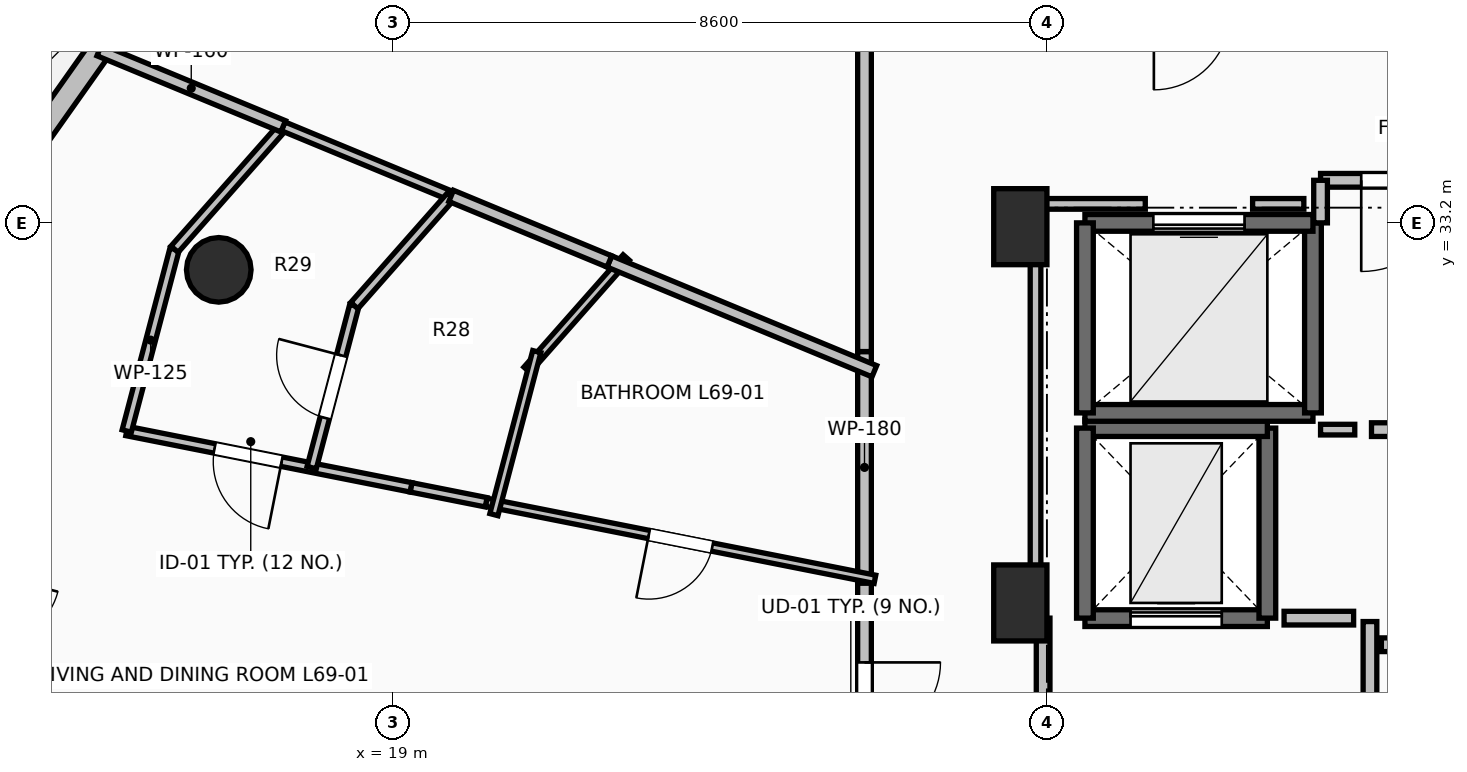
"""IFC4 building model, lengths in metres.
Left out: names, types, materials, properties, quantities, classifications, styles, units other than length and angle.
Written with IfcOpenShell. Run it as: python <this file> out.ifc"""

import sys

from ifc_helpers import new_model, si_unit, direction, frame, frame_2d, origin, origin_2d, place, context, subcontext, project, spatial, rectangle, circle, extrude, element, fill, save


model = new_model("IFC4")
c1 = context("Model", 3, precision=1e-05, world=origin(), true_north=direction((0.0, 1.0)))
c2 = subcontext(c1, "Body", "Model", "MODEL_VIEW")
j1 = project(units=[si_unit("LENGTHUNIT", "METRE"), si_unit("PLANEANGLEUNIT", "RADIAN")], contexts=[c1])
p1 = place(None, origin())
s1 = spatial("IfcSite", under=j1, at=p1, CompositionType="ELEMENT")
p2 = place(p1, origin())
s2 = spatial("IfcBuilding", under=s1, at=p2, CompositionType="ELEMENT")
p3 = place(p2, frame((0.0, 0.0, 255.55)))
s3 = spatial("IfcBuildingStorey", under=s2, at=p3, CompositionType="ELEMENT", Elevation=255.55)
p4 = place(p3, frame((16.705, 32.582, 0.0), z_axis=(0.0, 0.0, 1.0), x_axis=(-0.923879532511, 0.382683432365, 0.0)))
e1 = element("IfcColumn", 1, at=p4, inside=s3, PredefinedType="COLUMN", context=c2, shape_type="SweptSolid", body=[
    extrude(circle(Radius=0.425, at=origin_2d()), origin(), (0.0, 0.0, 1.0), 3.55),
])
for number, where, z_axis, x_axis in (
    (2, (27.25, 28.2, 0.0), (0.0, 0.0, 1.0), (1.0, 0.0, 0.0)),
    (3, (27.25, 33.15, 0.0), (0.0, 0.0, 1.0), (1.0, 0.0, 0.0)),
):
    element("IfcColumn", number, at=place(p3, frame(where, z_axis=z_axis, x_axis=x_axis)), inside=s3, PredefinedType="PILASTER", context=c2, shape_type="SweptSolid", body=[
        extrude(rectangle(XDim=0.7, YDim=1.0, at=origin_2d()), origin(), (0.0, 0.0, 1.0), 3.55),
    ])
p5 = place(p3, frame((16.216, 37.006, 0.0), z_axis=(0.0, 0.0, 1.0), x_axis=(-0.577261247247, -0.816559521668, 0.0)))
e4 = element("IfcWall", 4, at=p5, inside=s3, PredefinedType="STANDARD", context=c2, shape_type="SweptSolid", body=[
    extrude(rectangle(XDim=4.194, YDim=0.3, at=frame_2d((2.097, 0.0))), origin(), (0.0, 0.0, 1.0), 3.29),
])
p6 = place(p3, frame((28.1, 28.0, 0.0), z_axis=(0.0, 0.0, 1.0), x_axis=(1.0, 0.0, 0.0)))
e5 = element("IfcWall", 5, at=p6, inside=s3, PredefinedType="SHEAR", context=c2, shape_type="SweptSolid", body=[
    extrude(rectangle(XDim=2.4, YDim=0.22, at=frame_2d((1.2, 0.0))), origin(), (0.0, 0.0, 1.0), 3.29),
])
p7 = place(p6, frame((0.6, 0.0, 0.0)))
e6 = element("IfcOpeningElement", 6, at=p7, cuts=e5, PredefinedType="OPENING", context=c2, shape_type="SweptSolid", body=[
    extrude(rectangle(XDim=1.2, YDim=2.2, at=frame_2d((0.6, 1.1))), frame((0.0, 0.125, 0.0), z_axis=(0.0, -1.0, 0.0), x_axis=(1.0, 0.0, 0.0)), (0.0, 0.0, 1.0), 0.25),
])
p8 = place(p3, frame((30.5, 28.0, 0.0), z_axis=(0.0, 0.0, 1.0), x_axis=(0.0, 1.0, 0.0)))
e7 = element("IfcWall", 7, at=p8, inside=s3, PredefinedType="SHEAR", context=c2, shape_type="SweptSolid", body=[
    extrude(rectangle(XDim=2.5, YDim=0.22, at=frame_2d((1.25, 0.0))), origin(), (0.0, 0.0, 1.0), 3.29),
])
p9 = place(p3, frame((30.5, 30.5, 0.0), z_axis=(0.0, 0.0, 1.0), x_axis=(-1.0, 0.0, 0.0)))
e8 = element("IfcWall", 8, at=p9, inside=s3, PredefinedType="SHEAR", context=c2, shape_type="SweptSolid", body=[
    extrude(rectangle(XDim=2.4, YDim=0.22, at=frame_2d((1.2, 0.0))), origin(), (0.0, 0.0, 1.0), 3.29),
])
p10 = place(p3, frame((28.1, 30.5, 0.0), z_axis=(0.0, 0.0, 1.0), x_axis=(0.0, -1.0, 0.0)))
e9 = element("IfcWall", 9, at=p10, inside=s3, PredefinedType="SHEAR", context=c2, shape_type="SweptSolid", body=[
    extrude(rectangle(XDim=2.5, YDim=0.22, at=frame_2d((1.25, 0.0))), origin(), (0.0, 0.0, 1.0), 3.29),
])
p11 = place(p3, frame((28.1, 30.7, 0.0), z_axis=(0.0, 0.0, 1.0), x_axis=(1.0, 0.0, 0.0)))
e10 = element("IfcWall", 10, at=p11, inside=s3, PredefinedType="SOLIDWALL", context=c2, shape_type="SweptSolid", body=[
    extrude(rectangle(XDim=3.0, YDim=0.22, at=frame_2d((1.5, 0.0))), origin(), (0.0, 0.0, 1.0), 3.29),
])
p12 = place(p3, frame((31.1, 30.7, 0.0), z_axis=(0.0, 0.0, 1.0), x_axis=(0.0, 1.0, 0.0)))
e11 = element("IfcWall", 11, at=p12, inside=s3, PredefinedType="SOLIDWALL", context=c2, shape_type="SweptSolid", body=[
    extrude(rectangle(XDim=2.5, YDim=0.22, at=frame_2d((1.25, 0.0))), origin(), (0.0, 0.0, 1.0), 3.29),
])
p13 = place(p3, frame((31.1, 33.2, 0.0), z_axis=(0.0, 0.0, 1.0), x_axis=(-1.0, 0.0, 0.0)))
e12 = element("IfcWall", 12, at=p13, inside=s3, PredefinedType="SOLIDWALL", context=c2, shape_type="SweptSolid", body=[
    extrude(rectangle(XDim=3.0, YDim=0.22, at=frame_2d((1.5, 0.0))), origin(), (0.0, 0.0, 1.0), 3.29),
])
p14 = place(p13, frame((0.9, 0.0, 0.0)))
e13 = element("IfcOpeningElement", 13, at=p14, cuts=e12, PredefinedType="OPENING", context=c2, shape_type="SweptSolid", body=[
    extrude(rectangle(XDim=1.2, YDim=2.2, at=frame_2d((0.6, 1.1))), frame((0.0, 0.125, 0.0), z_axis=(0.0, -1.0, 0.0), x_axis=(1.0, 0.0, 0.0)), (0.0, 0.0, 1.0), 0.25),
])
p15 = place(p3, frame((28.1, 33.2, 0.0), z_axis=(0.0, 0.0, 1.0), x_axis=(0.0, -1.0, 0.0)))
e14 = element("IfcWall", 14, at=p15, inside=s3, PredefinedType="SOLIDWALL", context=c2, shape_type="SweptSolid", body=[
    extrude(rectangle(XDim=2.5, YDim=0.22, at=frame_2d((1.25, 0.0))), origin(), (0.0, 0.0, 1.0), 3.29),
])
p16 = place(p3, frame((31.85, 24.045, 0.0), z_axis=(0.0, 0.0, 1.0), x_axis=(0.0, 1.0, 0.0)))
e15 = element("IfcWall", 15, at=p16, inside=s3, PredefinedType="PARTITIONING", context=c2, shape_type="SweptSolid", body=[
    extrude(rectangle(XDim=3.91, YDim=0.18, at=frame_2d((1.955, 0.0))), origin(), (0.0, 0.0, 1.0), 3.29),
])
p17 = place(p16, frame((1.355, 0.0, 0.0)))
e16 = element("IfcOpeningElement", 16, at=p17, cuts=e15, PredefinedType="OPENING", context=c2, shape_type="SweptSolid", body=[
    extrude(rectangle(XDim=1.2, YDim=2.15, at=frame_2d((0.6, 1.075))), frame((0.0, 0.105, 0.0), z_axis=(0.0, -1.0, 0.0), x_axis=(1.0, 0.0, 0.0)), (0.0, 0.0, 1.0), 0.21),
])
p18 = place(p3, frame((27.55, 28.0, 0.0), z_axis=(0.0, 0.0, 1.0), x_axis=(0.0, -1.0, 0.0)))
e17 = element("IfcWall", 17, at=p18, inside=s3, PredefinedType="PARTITIONING", context=c2, shape_type="SweptSolid", body=[
    extrude(rectangle(XDim=4.05, YDim=0.18, at=frame_2d((2.025, 0.0))), origin(), (0.0, 0.0, 1.0), 3.29),
])
p19 = place(p18, frame((1.425, 0.0, 0.0)))
e18 = element("IfcOpeningElement", 18, at=p19, cuts=e17, PredefinedType="OPENING", context=c2, shape_type="SweptSolid", body=[
    extrude(rectangle(XDim=1.2, YDim=2.15, at=frame_2d((0.6, 1.075))), frame((0.0, 0.105, 0.0), z_axis=(0.0, -1.0, 0.0), x_axis=(1.0, 0.0, 0.0)), (0.0, 0.0, 1.0), 0.21),
])
p20 = place(p3, frame((31.87, 30.48, 0.0), z_axis=(0.0, 0.0, 1.0), x_axis=(1.0, 0.0, 0.0)))
e19 = element("IfcWall", 19, at=p20, inside=s3, PredefinedType="PARTITIONING", context=c2, shape_type="SweptSolid", body=[
    extrude(rectangle(XDim=1.6, YDim=0.18, at=frame_2d((0.8, 0.0))), origin(), (0.0, 0.0, 1.0), 3.29),
])
p21 = place(p3, frame((33.47, 33.76, 0.0), z_axis=(0.0, 0.0, 1.0), x_axis=(-1.0, 0.0, 0.0)))
e20 = element("IfcWall", 20, at=p21, inside=s3, PredefinedType="PARTITIONING", context=c2, shape_type="SweptSolid", body=[
    extrude(rectangle(XDim=2.27, YDim=0.18, at=frame_2d((1.135, 0.0))), origin(), (0.0, 0.0, 1.0), 3.29),
])
p22 = place(p21, frame((0.535, 0.0, 0.0)))
e21 = element("IfcOpeningElement", 21, at=p22, cuts=e20, PredefinedType="OPENING", context=c2, shape_type="SweptSolid", body=[
    extrude(rectangle(XDim=1.2, YDim=2.15, at=frame_2d((0.6, 1.075))), frame((0.0, 0.105, 0.0), z_axis=(0.0, -1.0, 0.0), x_axis=(1.0, 0.0, 0.0)), (0.0, 0.0, 1.0), 0.21),
])
p23 = place(p3, frame((31.2, 33.76, 0.0), z_axis=(0.0, 0.0, 1.0), x_axis=(0.0, -1.0, 0.0)))
e22 = element("IfcWall", 22, at=p23, inside=s3, PredefinedType="PARTITIONING", context=c2, shape_type="SweptSolid", body=[
    extrude(rectangle(XDim=0.56, YDim=0.18, at=frame_2d((0.28, 0.0))), origin(), (0.0, 0.0, 1.0), 3.29),
])
p24 = place(p3, frame((39.19, 27.65, 0.0), z_axis=(0.0, 0.0, 1.0), x_axis=(-1.0, 0.0, 0.0)))
e23 = element("IfcWall", 23, at=p24, inside=s3, PredefinedType="PARTITIONING", context=c2, shape_type="SweptSolid", body=[
    extrude(rectangle(XDim=7.19, YDim=0.18, at=frame_2d((3.595, 0.0))), origin(), (0.0, 0.0, 1.0), 3.29),
])
p25 = place(p24, frame((3.095, 0.0, 0.0)))
e24 = element("IfcOpeningElement", 24, at=p25, cuts=e23, PredefinedType="OPENING", context=c2, shape_type="SweptSolid", body=[
    extrude(rectangle(XDim=1.0, YDim=2.15, at=frame_2d((0.5, 1.075))), frame((0.0, 0.105, 0.0), z_axis=(0.0, -1.0, 0.0), x_axis=(1.0, 0.0, 0.0)), (0.0, 0.0, 1.0), 0.21),
])
p26 = place(p3, frame((25.2, 28.599, 0.0), z_axis=(0.0, 0.0, 1.0), x_axis=(0.0, -1.0, 0.0)))
e25 = element("IfcWall", 25, at=p26, inside=s3, PredefinedType="PARTITIONING", context=c2, shape_type="SweptSolid", body=[
    extrude(rectangle(XDim=3.363, YDim=0.18, at=frame_2d((1.682, 0.0))), origin(), (0.0, 0.0, 1.0), 2.482),
])
p27 = place(p26, frame((1.181, 0.0, 0.0)))
e26 = element("IfcOpeningElement", 26, at=p27, cuts=e25, PredefinedType="OPENING", context=c2, shape_type="SweptSolid", body=[
    extrude(rectangle(XDim=1.0, YDim=2.15, at=frame_2d((0.5, 1.075))), frame((0.0, 0.105, 0.0), z_axis=(0.0, -1.0, 0.0), x_axis=(1.0, 0.0, 0.0)), (0.0, 0.0, 1.0), 0.21),
])
p28 = place(p3, frame((25.2, 31.507, 0.0), z_axis=(0.0, 0.0, 1.0), x_axis=(0.0, -1.0, 0.0)))
e27 = element("IfcWall", 27, at=p28, inside=s3, PredefinedType="PARTITIONING", context=c2, shape_type="SweptSolid", body=[
    extrude(rectangle(XDim=3.048, YDim=0.18, at=frame_2d((1.524, 0.0))), origin(), (0.0, 0.0, 1.0), 2.482),
])
p29 = place(p3, frame((25.2, 35.95, 0.0), z_axis=(0.0, 0.0, 1.0), x_axis=(0.0, -1.0, 0.0)))
e28 = element("IfcWall", 28, at=p29, inside=s3, PredefinedType="PARTITIONING", context=c2, shape_type="SweptSolid", body=[
    extrude(rectangle(XDim=4.443, YDim=0.18, at=frame_2d((2.221, 0.0))), origin(), (0.0, 0.0, 1.0), 2.482),
])
p30 = place(p3, frame((19.236, 29.72, 0.0), z_axis=(0.0, 0.0, 1.0), x_axis=(-0.980906665774, 0.194479081243, 0.0)))
e29 = element("IfcWall", 29, at=p30, inside=s3, PredefinedType="PARTITIONING", context=c2, shape_type="SweptSolid", body=[
    extrude(rectangle(XDim=3.815, YDim=0.125, at=frame_2d((1.907, 0.0))), origin(), (0.0, 0.0, 1.0), 2.874),
])
p31 = place(p30, frame((1.737, 0.0, 0.0)))
e30 = element("IfcOpeningElement", 30, at=p31, cuts=e29, PredefinedType="OPENING", context=c2, shape_type="SweptSolid", body=[
    extrude(rectangle(XDim=0.9, YDim=2.1, at=frame_2d((0.45, 1.05))), frame((0.0, 0.077, 0.0), z_axis=(0.0, -1.0, 0.0), x_axis=(1.0, 0.0, 0.0)), (0.0, 0.0, 1.0), 0.155),
])
p32 = place(p3, frame((15.494, 30.462, 0.0), z_axis=(0.0, 0.0, 1.0), x_axis=(0.254459276467, 0.967083489995, 0.0)))
e31 = element("IfcWall", 31, at=p32, inside=s3, PredefinedType="PARTITIONING", context=c2, shape_type="SweptSolid", body=[
    extrude(rectangle(XDim=2.472, YDim=0.125, at=frame_2d((1.236, 0.0))), origin(), (0.0, 0.0, 1.0), 3.29),
])
p33 = place(p3, frame((16.123, 32.853, 0.0), z_axis=(0.0, 0.0, 1.0), x_axis=(0.662205183315, 0.749322557508, 0.0)))
e32 = element("IfcWall", 32, at=p33, inside=s3, PredefinedType="PARTITIONING", context=c2, shape_type="SweptSolid", body=[
    extrude(rectangle(XDim=2.158, YDim=0.125, at=frame_2d((1.079, 0.0))), origin(), (0.0, 0.0, 1.0), 3.29),
])
p34 = place(p3, frame((17.552, 34.47, 0.0), z_axis=(0.0, 0.0, 1.0), x_axis=(0.923932252837, -0.382556129434, 0.0)))
e33 = element("IfcWall", 33, at=p34, inside=s3, PredefinedType="PARTITIONING", context=c2, shape_type="SweptSolid", body=[
    extrude(rectangle(XDim=2.392, YDim=0.125, at=frame_2d((1.196, 0.0))), origin(), (0.0, 0.0, 1.0), 2.874),
])
p35 = place(p3, frame((25.337, 28.511, 0.0), z_axis=(0.0, 0.0, 1.0), x_axis=(-0.980930272027, 0.194359978959, 0.0)))
e34 = element("IfcWall", 34, at=p35, inside=s3, PredefinedType="PARTITIONING", context=c2, shape_type="SweptSolid", body=[
    extrude(rectangle(XDim=5.214, YDim=0.11, at=frame_2d((2.607, 0.0))), origin(), (0.0, 0.0, 1.0), 2.936),
])
p36 = place(p35, frame((2.182, 0.0, 0.0)))
e35 = element("IfcOpeningElement", 35, at=p36, cuts=e34, PredefinedType="OPENING", context=c2, shape_type="SweptSolid", body=[
    extrude(rectangle(XDim=0.85, YDim=2.1, at=frame_2d((0.425, 1.05))), frame((0.0, 0.07, 0.0), z_axis=(0.0, -1.0, 0.0), x_axis=(1.0, 0.0, 0.0)), (0.0, 0.0, 1.0), 0.14),
])
p37 = place(p3, frame((20.223, 29.524, 0.0), z_axis=(0.0, 0.0, 1.0), x_axis=(-0.98086901598, 0.194668881667, 0.0)))
e36 = element("IfcWall", 36, at=p37, inside=s3, PredefinedType="PARTITIONING", context=c2, shape_type="SweptSolid", body=[
    extrude(rectangle(XDim=1.006, YDim=0.125, at=frame_2d((0.503, 0.0))), origin(), (0.0, 0.0, 1.0), 3.022),
])
p38 = place(p3, frame((17.552, 34.47, 0.0), z_axis=(0.0, 0.0, 1.0), x_axis=(-0.9239134198, 0.382601610965, 0.0)))
e37 = element("IfcWall", 37, at=p38, inside=s3, PredefinedType="PARTITIONING", context=c2, shape_type="SweptSolid", body=[
    extrude(rectangle(XDim=2.618, YDim=0.16, at=frame_2d((1.309, 0.0))), origin(), (0.0, 0.0, 1.0), 3.29),
])
p39 = place(p3, frame((17.927, 29.98, 0.0), z_axis=(0.0, 0.0, 1.0), x_axis=(0.254476946675, 0.967078840432, 0.0)))
e38 = element("IfcWall", 38, at=p39, inside=s3, PredefinedType="PARTITIONING", context=c2, shape_type="SweptSolid", body=[
    extrude(rectangle(XDim=2.205, YDim=0.125, at=frame_2d((1.102, 0.0))), origin(), (0.0, 0.0, 1.0), 2.482),
])
p40 = place(p39, frame((0.677, 0.0, 0.0)))
e39 = element("IfcOpeningElement", 39, at=p40, cuts=e38, PredefinedType="OPENING", context=c2, shape_type="SweptSolid", body=[
    extrude(rectangle(XDim=0.85, YDim=2.1, at=frame_2d((0.425, 1.05))), frame((0.0, 0.077, 0.0), z_axis=(0.0, -1.0, 0.0), x_axis=(1.0, 0.0, 0.0)), (0.0, 0.0, 1.0), 0.155),
])
p41 = place(p3, frame((18.488, 32.112, 0.0), z_axis=(0.0, 0.0, 1.0), x_axis=(0.661856531983, 0.749630529709, 0.0)))
e40 = element("IfcWall", 40, at=p41, inside=s3, PredefinedType="PARTITIONING", context=c2, shape_type="SweptSolid", body=[
    extrude(rectangle(XDim=1.925, YDim=0.125, at=frame_2d((0.962, 0.0))), origin(), (0.0, 0.0, 1.0), 2.482),
])
p42 = place(p3, frame((22.066, 32.744, 0.0), z_axis=(0.0, 0.0, 1.0), x_axis=(-0.662047420969, -0.749461948593, 0.0)))
e41 = element("IfcWall", 41, at=p42, inside=s3, PredefinedType="PARTITIONING", context=c2, shape_type="SweptSolid", body=[
    extrude(rectangle(XDim=1.972, YDim=0.11, at=frame_2d((0.986, 0.0))), origin(), (0.0, 0.0, 1.0), 3.29),
])
p43 = place(p3, frame((20.889, 31.506, 0.0), z_axis=(0.0, 0.0, 1.0), x_axis=(-0.254406599134, -0.967097348935, 0.0)))
e42 = element("IfcWall", 42, at=p43, inside=s3, PredefinedType="PARTITIONING", context=c2, shape_type="SweptSolid", body=[
    extrude(rectangle(XDim=2.218, YDim=0.11, at=frame_2d((1.109, 0.0))), origin(), (0.0, 0.0, 1.0), 2.482),
])
p44 = place(p3, frame((25.329, 31.248, 0.0), z_axis=(0.0, 0.0, 1.0), x_axis=(-0.923827524065, 0.382808967736, 0.0)))
e43 = element("IfcWall", 43, at=p44, inside=s3, PredefinedType="PARTITIONING", context=c2, shape_type="SweptSolid", body=[
    extrude(rectangle(XDim=3.773, YDim=0.16, at=frame_2d((1.886, 0.0))), origin(), (0.0, 0.0, 1.0), 2.936),
])
p45 = place(p3, frame((21.844, 32.693, 0.0), z_axis=(0.0, 0.0, 1.0), x_axis=(-0.92387949598, 0.382683520559, 0.0)))
e44 = element("IfcWall", 44, at=p45, inside=s3, PredefinedType="PARTITIONING", context=c2, shape_type="SweptSolid", body=[
    extrude(rectangle(XDim=2.253, YDim=0.16, at=frame_2d((1.127, 0.0))), origin(), (0.0, 0.0, 1.0), 3.022),
])
p46 = place(p3, frame((31.635, 28.0, 0.0), z_axis=(0.0, 0.0, 1.0), x_axis=(-1.0, 0.0, 0.0)))
e45 = element("IfcWall", 45, at=p46, inside=s3, PredefinedType="PARTITIONING", context=c2, shape_type="SweptSolid", body=[
    extrude(rectangle(XDim=0.915, YDim=0.18, at=frame_2d((0.458, 0.0))), origin(), (0.0, 0.0, 1.0), 3.29),
])
p47 = place(p3, frame((31.2, 30.48, 0.0), z_axis=(0.0, 0.0, 1.0), x_axis=(1.0, 0.0, 0.0)))
e46 = element("IfcWall", 46, at=p47, inside=s3, PredefinedType="PARTITIONING", context=c2, shape_type="SweptSolid", body=[
    extrude(rectangle(XDim=0.45, YDim=0.14, at=frame_2d((0.225, 0.0))), origin(), (0.0, 0.0, 1.0), 3.29),
])
p48 = place(p3, frame((30.98, 33.45, 0.0), z_axis=(0.0, 0.0, 1.0), x_axis=(-1.0, 0.0, 0.0)))
e47 = element("IfcWall", 47, at=p48, inside=s3, PredefinedType="PARTITIONING", context=c2, shape_type="SweptSolid", body=[
    extrude(rectangle(XDim=0.674, YDim=0.14, at=frame_2d((0.337, 0.0))), origin(), (0.0, 0.0, 1.0), 3.29),
])
p49 = place(p3, frame((28.894, 33.45, 0.0), z_axis=(0.0, 0.0, 1.0), x_axis=(-1.0, 0.0, 0.0)))
e48 = element("IfcWall", 48, at=p49, inside=s3, PredefinedType="PARTITIONING", context=c2, shape_type="SweptSolid", body=[
    extrude(rectangle(XDim=1.444, YDim=0.14, at=frame_2d((0.722, 0.0))), origin(), (0.0, 0.0, 1.0), 2.482),
])
p50 = place(p3, frame((27.45, 33.45, 0.0), z_axis=(0.0, 0.0, 1.0), x_axis=(0.0, -1.0, 0.0)))
e49 = element("IfcWall", 49, at=p50, inside=s3, PredefinedType="PARTITIONING", context=c2, shape_type="SweptSolid", body=[
    extrude(rectangle(XDim=5.254, YDim=0.14, at=frame_2d((2.627, 0.0))), origin(), (0.0, 0.0, 1.0), 2.482),
])
p51 = place(p7, origin())
e50 = element("IfcDoor", 50, at=p51, inside=s3, OperationType="SLIDING_TO_LEFT", PredefinedType="DOOR", context=c2, shape_type="SweptSolid", body=[
    extrude(rectangle(XDim=1.2, YDim=2.2, at=frame_2d((0.6, 1.1))), frame((0.0, 0.025, 0.0), z_axis=(0.0, -1.0, 0.0), x_axis=(1.0, 0.0, 0.0)), (0.0, 0.0, 1.0), 0.05),
])
fill(e6, e50)
p52 = place(p14, origin())
e51 = element("IfcDoor", 51, at=p52, inside=s3, OperationType="SLIDING_TO_LEFT", PredefinedType="DOOR", context=c2, shape_type="SweptSolid", body=[
    extrude(rectangle(XDim=1.2, YDim=2.2, at=frame_2d((0.6, 1.1))), frame((0.0, 0.025, 0.0), z_axis=(0.0, -1.0, 0.0), x_axis=(1.0, 0.0, 0.0)), (0.0, 0.0, 1.0), 0.05),
])
fill(e13, e51)
p53 = place(p22, origin())
e52 = element("IfcDoor", 52, at=p53, inside=s3, OperationType="SINGLE_SWING_RIGHT", PredefinedType="DOOR", context=c2, shape_type="SweptSolid", body=[
    extrude(rectangle(XDim=1.2, YDim=2.15, at=frame_2d((0.6, 1.075))), frame((0.0, 0.025, 0.0), z_axis=(0.0, -1.0, 0.0), x_axis=(1.0, 0.0, 0.0)), (0.0, 0.0, 1.0), 0.05),
])
fill(e21, e52)
p54 = place(p27, origin())
e53 = element("IfcDoor", 53, at=p54, inside=s3, OperationType="SINGLE_SWING_LEFT", PredefinedType="DOOR", context=c2, shape_type="SweptSolid", body=[
    extrude(rectangle(XDim=1.0, YDim=2.15, at=frame_2d((0.5, 1.075))), frame((0.0, 0.025, 0.0), z_axis=(0.0, -1.0, 0.0), x_axis=(1.0, 0.0, 0.0)), (0.0, 0.0, 1.0), 0.05),
])
fill(e26, e53)
p55 = place(p31, origin())
e54 = element("IfcDoor", 54, at=p55, inside=s3, OperationType="SINGLE_SWING_LEFT", PredefinedType="DOOR", context=c2, shape_type="SweptSolid", body=[
    extrude(rectangle(XDim=0.9, YDim=2.1, at=frame_2d((0.45, 1.05))), frame((0.0, 0.025, 0.0), z_axis=(0.0, -1.0, 0.0), x_axis=(1.0, 0.0, 0.0)), (0.0, 0.0, 1.0), 0.05),
])
fill(e30, e54)
p56 = place(p36, origin())
e55 = element("IfcDoor", 55, at=p56, inside=s3, OperationType="SINGLE_SWING_RIGHT", PredefinedType="DOOR", context=c2, shape_type="SweptSolid", body=[
    extrude(rectangle(XDim=0.85, YDim=2.1, at=frame_2d((0.425, 1.05))), frame((0.0, 0.025, 0.0), z_axis=(0.0, -1.0, 0.0), x_axis=(1.0, 0.0, 0.0)), (0.0, 0.0, 1.0), 0.05),
])
fill(e35, e55)
p57 = place(p40, origin())
e56 = element("IfcDoor", 56, at=p57, inside=s3, OperationType="SINGLE_SWING_RIGHT", PredefinedType="DOOR", context=c2, shape_type="SweptSolid", body=[
    extrude(rectangle(XDim=0.85, YDim=2.1, at=frame_2d((0.425, 1.05))), frame((0.0, 0.025, 0.0), z_axis=(0.0, -1.0, 0.0), x_axis=(1.0, 0.0, 0.0)), (0.0, 0.0, 1.0), 0.05),
])
fill(e39, e56)
save(model, sys.argv[1])
